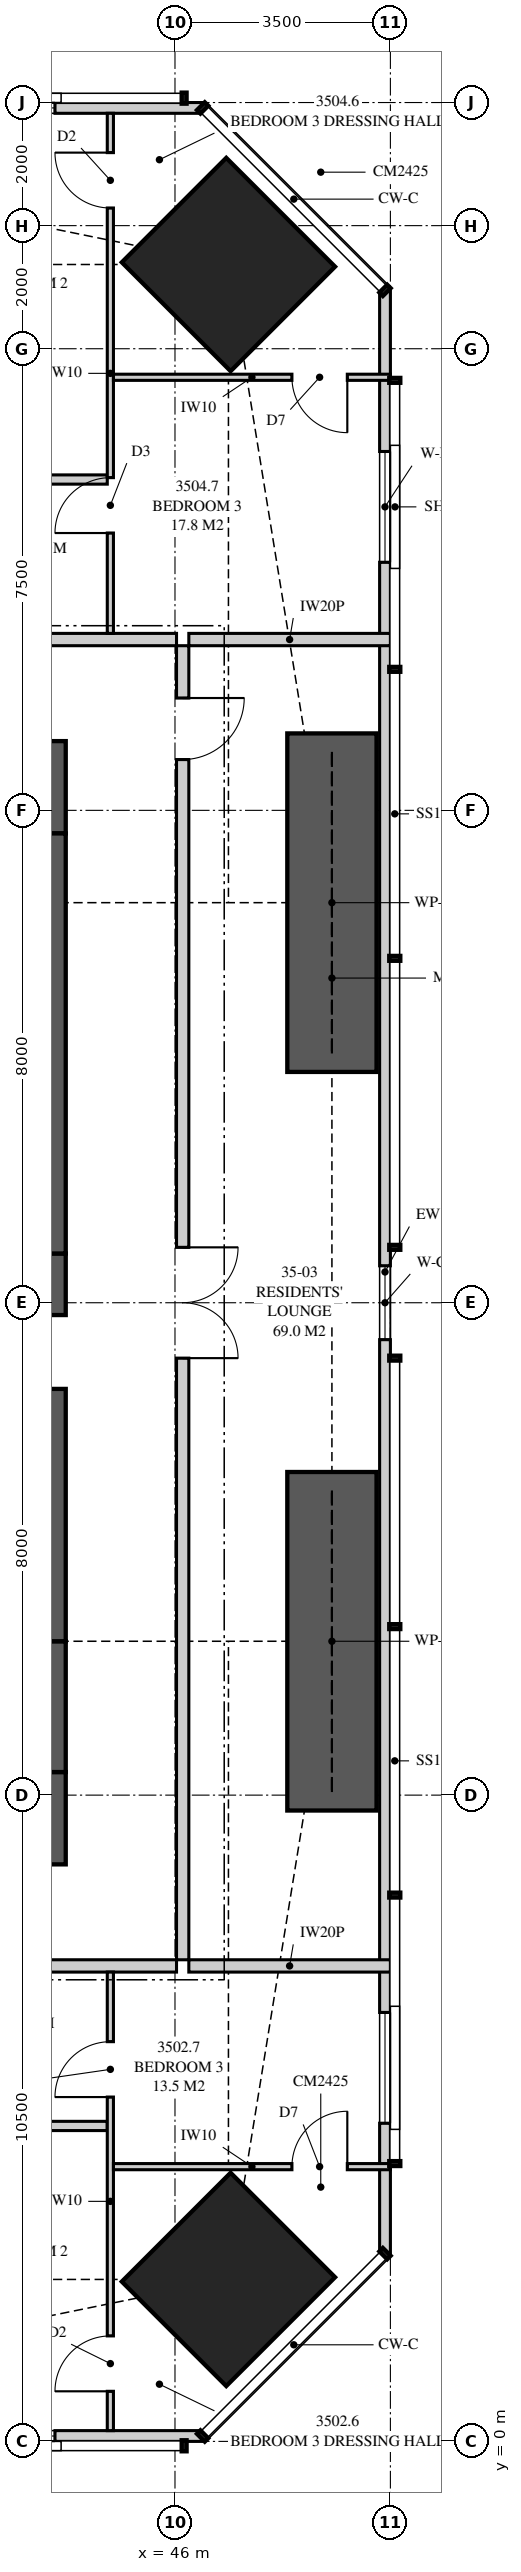
"""IFC4 building model, lengths in metres.
Left out: names, types, materials, properties, quantities, classifications, styles, units other than length and angle.
Written with IfcOpenShell. Run it as: python <this file> out.ifc"""

import sys

from ifc_helpers import new_model, si_unit, direction, frame, frame_2d, origin, origin_2d, place, context, subcontext, project, spatial, polyline, rectangle, outline, extrude, element, fill, save


model = new_model("IFC4")
c1 = context("Model", 3, precision=1e-05, world=origin(), true_north=direction((0.0, 1.0)))
c2 = subcontext(c1, "Body", "Model", "MODEL_VIEW")
j1 = project(units=[si_unit("LENGTHUNIT", "METRE"), si_unit("PLANEANGLEUNIT", "RADIAN")], contexts=[c1])
p1 = place(None, origin())
s1 = spatial("IfcSite", under=j1, at=p1, CompositionType="ELEMENT")
p2 = place(p1, origin())
s2 = spatial("IfcBuilding", under=s1, at=p2, CompositionType="ELEMENT")
p3 = place(p2, frame((0.0, 0.0, 128.3)))
s3 = spatial("IfcBuildingStorey", under=s2, at=p3, CompositionType="ELEMENT", Elevation=128.3)
for number, where, z_axis, x_axis in (
    (1, (46.869, 2.631, 0.0), (0.0, 0.0, 1.0), (-0.707, 0.707, 0.0)),
    (2, (46.869, 35.369, 0.0), (0.0, 0.0, 1.0), (-0.707, -0.707, 0.0)),
):
    element("IfcColumn", number, at=place(p3, frame(where, z_axis=z_axis, x_axis=x_axis)), inside=s3, PredefinedType="COLUMN", context=c2, shape_type="SweptSolid", body=[
        extrude(rectangle(XDim=2.4, YDim=2.5, at=origin_2d()), origin(), (0.0, 0.0, 1.0), 3.35),
    ])
p4 = place(p3, frame((35.9, 10.125, 0.0), z_axis=(0.0, 0.0, 1.0), x_axis=(1.0, 0.0, 0.0)))
e3 = element("IfcWall", 3, at=p4, inside=s3, PredefinedType="SHEAR", context=c2, shape_type="SweptSolid", body=[
    extrude(rectangle(XDim=8.325, YDim=1.5, at=frame_2d((4.163, 0.0))), origin(), (0.0, 0.0, 1.0), 3.35),
])
p5 = place(p4, frame((2.7, 0.0, 0.0)))
e4 = element("IfcOpeningElement", 4, at=p5, cuts=e3, PredefinedType="OPENING", context=c2, shape_type="SweptSolid", body=[
    extrude(rectangle(XDim=1.0, YDim=2.1, at=frame_2d((0.5, 1.05))), frame((0.0, 0.76, 0.0), z_axis=(0.0, -1.0, 0.0), x_axis=(1.0, 0.0, 0.0)), (0.0, 0.0, 1.0), 1.52),
])
p6 = place(p3, frame((44.225, 26.875, 0.0), z_axis=(0.0, 0.0, 1.0), x_axis=(-1.0, 0.0, 0.0)))
e5 = element("IfcWall", 5, at=p6, inside=s3, PredefinedType="SHEAR", context=c2, shape_type="SweptSolid", body=[
    extrude(rectangle(XDim=8.325, YDim=1.5, at=frame_2d((4.163, 0.0))), origin(), (0.0, 0.0, 1.0), 3.35),
])
p7 = place(p6, frame((5.725, 0.0, 0.0)))
e6 = element("IfcOpeningElement", 6, at=p7, cuts=e5, PredefinedType="OPENING", context=c2, shape_type="SweptSolid", body=[
    extrude(rectangle(XDim=0.9, YDim=2.1, at=frame_2d((0.45, 1.05))), frame((0.0, 0.76, 0.0), z_axis=(0.0, -1.0, 0.0), x_axis=(1.0, 0.0, 0.0)), (0.0, 0.0, 1.0), 1.52),
])
p8 = place(p3, frame((43.8, 10.875, 0.0), z_axis=(0.0, 0.0, 1.0), x_axis=(0.0, 1.0, 0.0)))
e7 = element("IfcWall", 7, at=p8, inside=s3, PredefinedType="SHEAR", context=c2, shape_type="SweptSolid", body=[
    extrude(rectangle(XDim=2.125, YDim=0.85, at=frame_2d((1.062, 0.0))), origin(), (0.0, 0.0, 1.0), 3.35),
])
p9 = place(p3, frame((43.8, 13.0, 0.0), z_axis=(0.0, 0.0, 1.0), x_axis=(0.0, 1.0, 0.0)))
e8 = element("IfcWall", 8, at=p9, inside=s3, PredefinedType="SHEAR", context=c2, shape_type="SweptSolid", body=[
    extrude(rectangle(XDim=6.3, YDim=0.85, at=frame_2d((3.15, 0.0))), origin(), (0.0, 0.0, 1.0), 3.35),
])
p10 = place(p9, frame((4.1, 0.0, 0.0)))
e9 = element("IfcOpeningElement", 9, at=p10, cuts=e8, PredefinedType="OPENING", context=c2, shape_type="SweptSolid", body=[
    extrude(rectangle(XDim=1.2, YDim=2.2, at=frame_2d((0.6, 1.1))), frame((0.0, 0.435, 0.0), z_axis=(0.0, -1.0, 0.0), x_axis=(1.0, 0.0, 0.0)), (0.0, 0.0, 1.0), 0.87),
])
p11 = place(p3, frame((43.8, 19.3, 0.0), z_axis=(0.0, 0.0, 1.0), x_axis=(0.0, 1.0, 0.0)))
e10 = element("IfcWall", 10, at=p11, inside=s3, PredefinedType="SHEAR", context=c2, shape_type="SweptSolid", body=[
    extrude(rectangle(XDim=6.825, YDim=0.85, at=frame_2d((3.413, 0.0))), origin(), (0.0, 0.0, 1.0), 3.35),
])
p12 = place(p3, frame((35.775, 0.087, 0.0), z_axis=(0.0, 0.0, 1.0), x_axis=(1.0, 0.0, 0.0)))
e11 = element("IfcWall", 11, at=p12, inside=s3, PredefinedType="SOLIDWALL", context=c2, shape_type="SweptSolid", body=[
    extrude(outline(polyline([(0.0, 0.0), (10.674, 0.0), (10.674, 3.11), (3.053, 3.11), (3.053, 2.15), (3.008, 2.15), (3.008, 3.11), (2.85, 3.11), (2.85, 2.15), (0.0, 2.15), (0.0, 0.0)])), frame((0.0, 0.087, 0.0), z_axis=(0.0, -1.0, 0.0), x_axis=(1.0, 0.0, 0.0)), (0.0, 0.0, 1.0), 0.175),
])
p13 = place(p12, frame((6.475, 0.0, 0.4)))
e12 = element("IfcOpeningElement", 12, at=p13, cuts=e11, PredefinedType="OPENING", context=c2, shape_type="SweptSolid", body=[
    extrude(rectangle(XDim=1.8, YDim=1.7, at=frame_2d((0.9, 0.85))), frame((0.0, 0.097, 0.0), z_axis=(0.0, -1.0, 0.0), x_axis=(1.0, 0.0, 0.0)), (0.0, 0.0, 1.0), 0.195),
])
p14 = place(p3, frame((49.413, 3.051, 0.0), z_axis=(0.0, 0.0, 1.0), x_axis=(0.0, 1.0, 0.0)))
e13 = element("IfcWall", 13, at=p14, inside=s3, PredefinedType="SOLIDWALL", context=c2, shape_type="SweptSolid", body=[
    extrude(outline(polyline([(0.0, 0.0), (31.897, 0.0), (31.897, 3.11), (22.167, 3.11), (22.167, 2.15), (22.074, 2.15), (22.074, 3.11), (21.949, 3.11), (21.949, 2.15), (9.949, 2.15), (9.949, 3.11), (9.823, 3.11), (9.823, 2.15), (9.73, 2.15), (9.73, 3.11), (0.0, 3.11), (0.0, 0.0)])), frame((0.0, 0.087, 0.0), z_axis=(0.0, -1.0, 0.0), x_axis=(1.0, 0.0, 0.0)), (0.0, 0.0, 1.0), 0.175),
])
p15 = place(p14, frame((2.118, 0.0, 0.4)))
e14 = element("IfcOpeningElement", 14, at=p15, cuts=e13, PredefinedType="OPENING", context=c2, shape_type="SweptSolid", body=[
    extrude(rectangle(XDim=1.8, YDim=1.7, at=frame_2d((0.9, 0.85))), frame((0.0, 0.097, 0.0), z_axis=(0.0, -1.0, 0.0), x_axis=(1.0, 0.0, 0.0)), (0.0, 0.0, 1.0), 0.195),
])
p16 = place(p14, frame((14.849, 0.0, 0.4)))
e15 = element("IfcOpeningElement", 15, at=p16, cuts=e13, PredefinedType="OPENING", context=c2, shape_type="SweptSolid", body=[
    extrude(rectangle(XDim=1.2, YDim=1.7, at=frame_2d((0.6, 0.85))), frame((0.0, 0.097, 0.0), z_axis=(0.0, -1.0, 0.0), x_axis=(1.0, 0.0, 0.0)), (0.0, 0.0, 1.0), 0.195),
])
p17 = place(p14, frame((27.479, 0.0, 0.4)))
e16 = element("IfcOpeningElement", 16, at=p17, cuts=e13, PredefinedType="OPENING", context=c2, shape_type="SweptSolid", body=[
    extrude(rectangle(XDim=1.8, YDim=1.7, at=frame_2d((0.9, 0.85))), frame((0.0, 0.097, 0.0), z_axis=(0.0, -1.0, 0.0), x_axis=(1.0, 0.0, 0.0)), (0.0, 0.0, 1.0), 0.195),
])
p18 = place(p3, frame((46.449, 37.913, 0.0), z_axis=(0.0, 0.0, 1.0), x_axis=(-1.0, 0.0, 0.0)))
e17 = element("IfcWall", 17, at=p18, inside=s3, PredefinedType="SOLIDWALL", context=c2, shape_type="SweptSolid", body=[
    extrude(outline(polyline([(0.0, 0.0), (10.674, 0.0), (10.674, 2.15), (7.824, 2.15), (7.824, 3.11), (7.666, 3.11), (7.666, 2.15), (7.62, 2.15), (7.62, 3.11), (0.0, 3.11), (0.0, 0.0)])), frame((0.0, 0.087, 0.0), z_axis=(0.0, -1.0, 0.0), x_axis=(1.0, 0.0, 0.0)), (0.0, 0.0, 1.0), 0.175),
])
p19 = place(p18, frame((2.399, 0.0, 0.4)))
e18 = element("IfcOpeningElement", 18, at=p19, cuts=e17, PredefinedType="OPENING", context=c2, shape_type="SweptSolid", body=[
    extrude(rectangle(XDim=1.8, YDim=1.7, at=frame_2d((0.9, 0.85))), frame((0.0, 0.097, 0.0), z_axis=(0.0, -1.0, 0.0), x_axis=(1.0, 0.0, 0.0)), (0.0, 0.0, 1.0), 0.195),
])
p20 = place(p3, frame((44.95, 0.175, 0.0), z_axis=(0.0, 0.0, 1.0), x_axis=(0.0, 1.0, 0.0)))
e19 = element("IfcWall", 19, at=p20, inside=s3, PredefinedType="PARTITIONING", context=c2, shape_type="SweptSolid", body=[
    extrude(outline(polyline([(0.0, 0.0), (7.45, 0.0), (7.45, 3.11), (3.716, 3.11), (3.716, 2.51), (2.943, 2.51), (2.943, 2.15), (1.188, 2.15), (1.188, 3.11), (0.0, 3.11), (0.0, 0.0)])), frame((0.0, 0.05, 0.0), z_axis=(0.0, -1.0, 0.0), x_axis=(1.0, 0.0, 0.0)), (0.0, 0.0, 1.0), 0.1),
])
p21 = place(p20, frame((0.639, 0.0, 0.0)))
e20 = element("IfcOpeningElement", 20, at=p21, cuts=e19, PredefinedType="OPENING", context=c2, shape_type="SweptSolid", body=[
    extrude(rectangle(XDim=0.9, YDim=2.1, at=frame_2d((0.45, 1.05))), frame((0.0, 0.06, 0.0), z_axis=(0.0, -1.0, 0.0), x_axis=(1.0, 0.0, 0.0)), (0.0, 0.0, 1.0), 0.12),
])
p22 = place(p20, frame((5.419, 0.0, 0.0)))
e21 = element("IfcOpeningElement", 21, at=p22, cuts=e19, PredefinedType="OPENING", context=c2, shape_type="SweptSolid", body=[
    extrude(rectangle(XDim=0.9, YDim=2.1, at=frame_2d((0.45, 1.05))), frame((0.0, 0.06, 0.0), z_axis=(0.0, -1.0, 0.0), x_axis=(1.0, 0.0, 0.0)), (0.0, 0.0, 1.0), 0.12),
])
p23 = place(p3, frame((41.4, 5.125, 0.0), z_axis=(0.0, 0.0, 1.0), x_axis=(1.0, 0.0, 0.0)))
e22 = element("IfcWall", 22, at=p23, inside=s3, PredefinedType="PLUMBINGWALL", context=c2, shape_type="SweptSolid", body=[
    extrude(rectangle(XDim=3.5, YDim=0.15, at=frame_2d((1.75, 0.0))), origin(), (0.0, 0.0, 1.0), 3.11),
])
p24 = place(p3, frame((45.0, 4.464, 0.0), z_axis=(0.0, 0.0, 1.0), x_axis=(1.0, 0.0, 0.0)))
e23 = element("IfcWall", 23, at=p24, inside=s3, PredefinedType="PARTITIONING", context=c2, shape_type="SweptSolid", body=[
    extrude(outline(polyline([(0.0, 0.0), (4.5, 0.0), (4.5, 3.11), (3.037, 3.11), (3.037, 2.15), (1.294, 2.15), (1.294, 3.11), (0.0, 3.11), (0.0, 0.0)])), frame((0.0, 0.05, 0.0), z_axis=(0.0, -1.0, 0.0), x_axis=(1.0, 0.0, 0.0)), (0.0, 0.0, 1.0), 0.1),
])
p25 = place(p24, frame((2.9, 0.0, 0.0)))
e24 = element("IfcOpeningElement", 24, at=p25, cuts=e23, PredefinedType="OPENING", context=c2, shape_type="SweptSolid", body=[
    extrude(rectangle(XDim=0.9, YDim=2.1, at=frame_2d((0.45, 1.05))), frame((0.0, 0.06, 0.0), z_axis=(0.0, -1.0, 0.0), x_axis=(1.0, 0.0, 0.0)), (0.0, 0.0, 1.0), 0.12),
])
p26 = place(p3, frame((46.225, 7.725, 0.0), z_axis=(0.0, 0.0, 1.0), x_axis=(1.0, 0.0, 0.0)))
e25 = element("IfcWall", 25, at=p26, inside=s3, PredefinedType="PARTITIONING", context=c2, shape_type="SweptSolid", body=[
    extrude(outline(polyline([(0.0, 0.0), (3.275, 0.0), (3.275, 3.11), (2.392, 3.11), (2.392, 2.15), (0.643, 2.15), (0.643, 2.541), (0.306, 2.541), (0.306, 3.11), (0.0, 3.11), (0.0, 0.0)])), frame((0.0, 0.1, 0.0), z_axis=(0.0, -1.0, 0.0), x_axis=(1.0, 0.0, 0.0)), (0.0, 0.0, 1.0), 0.2),
])
p27 = place(p3, frame((44.95, 37.825, 0.0), z_axis=(0.0, 0.0, 1.0), x_axis=(0.0, -1.0, 0.0)))
e26 = element("IfcWall", 26, at=p27, inside=s3, PredefinedType="PARTITIONING", context=c2, shape_type="SweptSolid", body=[
    extrude(outline(polyline([(0.0, 0.0), (8.45, 0.0), (8.45, 3.11), (3.716, 3.11), (3.716, 2.51), (2.943, 2.51), (2.943, 2.15), (1.188, 2.15), (1.188, 3.11), (0.0, 3.11), (0.0, 0.0)])), frame((0.0, 0.05, 0.0), z_axis=(0.0, -1.0, 0.0), x_axis=(1.0, 0.0, 0.0)), (0.0, 0.0, 1.0), 0.1),
])
p28 = place(p27, frame((0.639, 0.0, 0.0)))
e27 = element("IfcOpeningElement", 27, at=p28, cuts=e26, PredefinedType="OPENING", context=c2, shape_type="SweptSolid", body=[
    extrude(rectangle(XDim=0.9, YDim=2.1, at=frame_2d((0.45, 1.05))), frame((0.0, 0.06, 0.0), z_axis=(0.0, -1.0, 0.0), x_axis=(1.0, 0.0, 0.0)), (0.0, 0.0, 1.0), 0.12),
])
p29 = place(p27, frame((5.919, 0.0, 0.0)))
e28 = element("IfcOpeningElement", 28, at=p29, cuts=e26, PredefinedType="OPENING", context=c2, shape_type="SweptSolid", body=[
    extrude(rectangle(XDim=0.9, YDim=2.1, at=frame_2d((0.45, 1.05))), frame((0.0, 0.06, 0.0), z_axis=(0.0, -1.0, 0.0), x_axis=(1.0, 0.0, 0.0)), (0.0, 0.0, 1.0), 0.12),
])
p30 = place(p3, frame((41.4, 31.875, 0.0), z_axis=(0.0, 0.0, 1.0), x_axis=(1.0, 0.0, 0.0)))
e29 = element("IfcWall", 29, at=p30, inside=s3, PredefinedType="PLUMBINGWALL", context=c2, shape_type="SweptSolid", body=[
    extrude(rectangle(XDim=3.5, YDim=0.15, at=frame_2d((1.75, 0.0))), origin(), (0.0, 0.0, 1.0), 3.11),
])
p31 = place(p3, frame((45.0, 33.536, 0.0), z_axis=(0.0, 0.0, 1.0), x_axis=(1.0, 0.0, 0.0)))
e30 = element("IfcWall", 30, at=p31, inside=s3, PredefinedType="PARTITIONING", context=c2, shape_type="SweptSolid", body=[
    extrude(outline(polyline([(0.0, 0.0), (4.5, 0.0), (4.5, 3.11), (3.037, 3.11), (3.037, 2.15), (1.294, 2.15), (1.294, 3.11), (0.0, 3.11), (0.0, 0.0)])), frame((0.0, 0.05, 0.0), z_axis=(0.0, -1.0, 0.0), x_axis=(1.0, 0.0, 0.0)), (0.0, 0.0, 1.0), 0.1),
])
p32 = place(p31, frame((2.9, 0.0, 0.0)))
e31 = element("IfcOpeningElement", 31, at=p32, cuts=e30, PredefinedType="OPENING", context=c2, shape_type="SweptSolid", body=[
    extrude(rectangle(XDim=0.9, YDim=2.1, at=frame_2d((0.45, 1.05))), frame((0.0, 0.06, 0.0), z_axis=(0.0, -1.0, 0.0), x_axis=(1.0, 0.0, 0.0)), (0.0, 0.0, 1.0), 0.12),
])
p33 = place(p3, frame((46.225, 29.275, 0.0), z_axis=(0.0, 0.0, 1.0), x_axis=(1.0, 0.0, 0.0)))
e32 = element("IfcWall", 32, at=p33, inside=s3, PredefinedType="PARTITIONING", context=c2, shape_type="SweptSolid", body=[
    extrude(outline(polyline([(0.0, 0.0), (3.275, 0.0), (3.275, 3.11), (2.554, 3.11), (2.554, 2.15), (0.805, 2.15), (0.805, 2.541), (0.306, 2.541), (0.306, 3.11), (0.0, 3.11), (0.0, 0.0)])), frame((0.0, 0.1, 0.0), z_axis=(0.0, -1.0, 0.0), x_axis=(1.0, 0.0, 0.0)), (0.0, 0.0, 1.0), 0.2),
])
p34 = place(p3, frame((46.125, 7.825, 0.0), z_axis=(0.0, 0.0, 1.0), x_axis=(0.0, 1.0, 0.0)))
e33 = element("IfcWall", 33, at=p34, inside=s3, PredefinedType="PARTITIONING", context=c2, shape_type="SweptSolid", body=[
    extrude(outline(polyline([(0.0, 0.0), (21.35, 0.0), (21.35, 3.11), (17.512, 3.11), (17.512, 2.541), (16.838, 2.541), (16.838, 3.11), (5.512, 3.11), (5.512, 2.541), (4.838, 2.541), (4.838, 3.11), (0.0, 3.11), (0.0, 0.0)])), frame((0.0, 0.1, 0.0), z_axis=(0.0, -1.0, 0.0), x_axis=(1.0, 0.0, 0.0)), (0.0, 0.0, 1.0), 0.2),
])
p35 = place(p34, frame((9.775, 0.0, 0.0)))
e34 = element("IfcOpeningElement", 34, at=p35, cuts=e33, PredefinedType="OPENING", context=c2, shape_type="SweptSolid", body=[
    extrude(rectangle(XDim=1.8, YDim=2.1, at=frame_2d((0.9, 1.05))), frame((0.0, 0.11, 0.0), z_axis=(0.0, -1.0, 0.0), x_axis=(1.0, 0.0, 0.0)), (0.0, 0.0, 1.0), 0.22),
])
p36 = place(p34, frame((19.5, 0.0, 0.0)))
e35 = element("IfcOpeningElement", 35, at=p36, cuts=e33, PredefinedType="OPENING", context=c2, shape_type="SweptSolid", body=[
    extrude(rectangle(XDim=1.0, YDim=2.1, at=frame_2d((0.5, 1.05))), frame((0.0, 0.11, 0.0), z_axis=(0.0, -1.0, 0.0), x_axis=(1.0, 0.0, 0.0)), (0.0, 0.0, 1.0), 0.22),
])
p37 = place(p3, frame((39.6, 7.725, 0.0), z_axis=(0.0, 0.0, 1.0), x_axis=(1.0, 0.0, 0.0)))
e36 = element("IfcWall", 36, at=p37, inside=s3, PredefinedType="PARTITIONING", context=c2, shape_type="SweptSolid", body=[
    extrude(rectangle(XDim=6.425, YDim=0.2, at=frame_2d((3.212, 0.0))), origin(), (0.0, 0.0, 1.0), 3.11),
])
p38 = place(p3, frame((40.8, 29.275, 0.0), z_axis=(0.0, 0.0, 1.0), x_axis=(1.0, 0.0, 0.0)))
e37 = element("IfcWall", 37, at=p38, inside=s3, PredefinedType="PARTITIONING", context=c2, shape_type="SweptSolid", body=[
    extrude(rectangle(XDim=5.225, YDim=0.2, at=frame_2d((2.612, 0.0))), origin(), (0.0, 0.0, 1.0), 3.11),
])
for number, where, z_axis, x_axis in (
    (38, (48.55, 10.25, 0.0), (0.0, 0.0, 1.0), (0.0, 1.0, 0.0)),
    (39, (48.55, 22.25, 0.0), (0.0, 0.0, 1.0), (0.0, 1.0, 0.0)),
):
    element("IfcWall", number, at=place(p3, frame(where, z_axis=z_axis, x_axis=x_axis)), inside=s3, PredefinedType="SHEAR", context=c2, shape_type="SweptSolid", body=[
        extrude(rectangle(XDim=5.5, YDim=1.45, at=frame_2d((2.75, 0.0))), origin(), (0.0, 0.0, 1.0), 3.35),
    ])
p39 = place(p13, origin())
e40 = element("IfcWindow", 40, at=p39, inside=s3, PartitioningType="SINGLE_PANEL", PredefinedType="WINDOW", context=c2, shape_type="SweptSolid", body=[
    extrude(rectangle(XDim=1.8, YDim=1.7, at=frame_2d((0.9, 0.85))), frame((0.0, 0.03, 0.0), z_axis=(0.0, -1.0, 0.0), x_axis=(1.0, 0.0, 0.0)), (0.0, 0.0, 1.0), 0.06),
])
fill(e12, e40)
p40 = place(p15, origin())
e41 = element("IfcWindow", 41, at=p40, inside=s3, PartitioningType="SINGLE_PANEL", PredefinedType="WINDOW", context=c2, shape_type="SweptSolid", body=[
    extrude(rectangle(XDim=1.8, YDim=1.7, at=frame_2d((0.9, 0.85))), frame((0.0, 0.03, 0.0), z_axis=(0.0, -1.0, 0.0), x_axis=(1.0, 0.0, 0.0)), (0.0, 0.0, 1.0), 0.06),
])
fill(e14, e41)
p41 = place(p16, origin())
e42 = element("IfcWindow", 42, at=p41, inside=s3, PartitioningType="SINGLE_PANEL", PredefinedType="WINDOW", context=c2, shape_type="SweptSolid", body=[
    extrude(rectangle(XDim=1.2, YDim=1.7, at=frame_2d((0.6, 0.85))), frame((0.0, 0.03, 0.0), z_axis=(0.0, -1.0, 0.0), x_axis=(1.0, 0.0, 0.0)), (0.0, 0.0, 1.0), 0.06),
])
fill(e15, e42)
p42 = place(p17, origin())
e43 = element("IfcWindow", 43, at=p42, inside=s3, PartitioningType="SINGLE_PANEL", PredefinedType="WINDOW", context=c2, shape_type="SweptSolid", body=[
    extrude(rectangle(XDim=1.8, YDim=1.7, at=frame_2d((0.9, 0.85))), frame((0.0, 0.03, 0.0), z_axis=(0.0, -1.0, 0.0), x_axis=(1.0, 0.0, 0.0)), (0.0, 0.0, 1.0), 0.06),
])
fill(e16, e43)
p43 = place(p19, origin())
e44 = element("IfcWindow", 44, at=p43, inside=s3, PartitioningType="SINGLE_PANEL", PredefinedType="WINDOW", context=c2, shape_type="SweptSolid", body=[
    extrude(rectangle(XDim=1.8, YDim=1.7, at=frame_2d((0.9, 0.85))), frame((0.0, 0.03, 0.0), z_axis=(0.0, -1.0, 0.0), x_axis=(1.0, 0.0, 0.0)), (0.0, 0.0, 1.0), 0.06),
])
fill(e18, e44)
p44 = place(p25, origin())
e45 = element("IfcDoor", 45, at=p44, inside=s3, OperationType="SINGLE_SWING_RIGHT", PredefinedType="DOOR", context=c2, shape_type="SweptSolid", body=[
    extrude(rectangle(XDim=0.9, YDim=2.1, at=frame_2d((0.45, 1.05))), frame((0.0, 0.025, 0.0), z_axis=(0.0, -1.0, 0.0), x_axis=(1.0, 0.0, 0.0)), (0.0, 0.0, 1.0), 0.05),
])
fill(e24, e45)
p45 = place(p21, origin())
e46 = element("IfcDoor", 46, at=p45, inside=s3, OperationType="SINGLE_SWING_LEFT", PredefinedType="DOOR", context=c2, shape_type="SweptSolid", body=[
    extrude(rectangle(XDim=0.9, YDim=2.1, at=frame_2d((0.45, 1.05))), frame((0.0, 0.025, 0.0), z_axis=(0.0, -1.0, 0.0), x_axis=(1.0, 0.0, 0.0)), (0.0, 0.0, 1.0), 0.05),
])
fill(e20, e46)
p46 = place(p22, origin())
e47 = element("IfcDoor", 47, at=p46, inside=s3, OperationType="SINGLE_SWING_LEFT", PredefinedType="DOOR", context=c2, shape_type="SweptSolid", body=[
    extrude(rectangle(XDim=0.9, YDim=2.1, at=frame_2d((0.45, 1.05))), frame((0.0, 0.025, 0.0), z_axis=(0.0, -1.0, 0.0), x_axis=(1.0, 0.0, 0.0)), (0.0, 0.0, 1.0), 0.05),
])
fill(e21, e47)
p47 = place(p32, frame((0.9, 0.0, 0.0), z_axis=(0.0, 0.0, 1.0), x_axis=(-1.0, 0.0, 0.0)))
e48 = element("IfcDoor", 48, at=p47, inside=s3, OperationType="SINGLE_SWING_LEFT", PredefinedType="DOOR", context=c2, shape_type="SweptSolid", body=[
    extrude(rectangle(XDim=0.9, YDim=2.1, at=frame_2d((0.45, 1.05))), frame((0.0, 0.025, 0.0), z_axis=(0.0, -1.0, 0.0), x_axis=(1.0, 0.0, 0.0)), (0.0, 0.0, 1.0), 0.05),
])
fill(e31, e48)
p48 = place(p28, frame((0.9, 0.0, 0.0), z_axis=(0.0, 0.0, 1.0), x_axis=(-1.0, 0.0, 0.0)))
e49 = element("IfcDoor", 49, at=p48, inside=s3, OperationType="SINGLE_SWING_RIGHT", PredefinedType="DOOR", context=c2, shape_type="SweptSolid", body=[
    extrude(rectangle(XDim=0.9, YDim=2.1, at=frame_2d((0.45, 1.05))), frame((0.0, 0.025, 0.0), z_axis=(0.0, -1.0, 0.0), x_axis=(1.0, 0.0, 0.0)), (0.0, 0.0, 1.0), 0.05),
])
fill(e27, e49)
p49 = place(p29, frame((0.9, 0.0, 0.0), z_axis=(0.0, 0.0, 1.0), x_axis=(-1.0, 0.0, 0.0)))
e50 = element("IfcDoor", 50, at=p49, inside=s3, OperationType="SINGLE_SWING_LEFT", PredefinedType="DOOR", context=c2, shape_type="SweptSolid", body=[
    extrude(rectangle(XDim=0.9, YDim=2.1, at=frame_2d((0.45, 1.05))), frame((0.0, 0.025, 0.0), z_axis=(0.0, -1.0, 0.0), x_axis=(1.0, 0.0, 0.0)), (0.0, 0.0, 1.0), 0.05),
])
fill(e28, e50)
p50 = place(p35, frame((1.8, 0.0, 0.0), z_axis=(0.0, 0.0, 1.0), x_axis=(-1.0, 0.0, 0.0)))
e51 = element("IfcDoor", 51, at=p50, inside=s3, OperationType="DOUBLE_DOOR_SINGLE_SWING", PredefinedType="DOOR", context=c2, shape_type="SweptSolid", body=[
    extrude(rectangle(XDim=1.8, YDim=2.1, at=frame_2d((0.9, 1.05))), frame((0.0, 0.025, 0.0), z_axis=(0.0, -1.0, 0.0), x_axis=(1.0, 0.0, 0.0)), (0.0, 0.0, 1.0), 0.05),
])
fill(e34, e51)
p51 = place(p36, frame((1.0, 0.0, 0.0), z_axis=(0.0, 0.0, 1.0), x_axis=(-1.0, 0.0, 0.0)))
e52 = element("IfcDoor", 52, at=p51, inside=s3, OperationType="SINGLE_SWING_LEFT", PredefinedType="DOOR", context=c2, shape_type="SweptSolid", body=[
    extrude(rectangle(XDim=1.0, YDim=2.1, at=frame_2d((0.5, 1.05))), frame((0.0, 0.025, 0.0), z_axis=(0.0, -1.0, 0.0), x_axis=(1.0, 0.0, 0.0)), (0.0, 0.0, 1.0), 0.05),
])
fill(e35, e52)
save(model, sys.argv[1])
